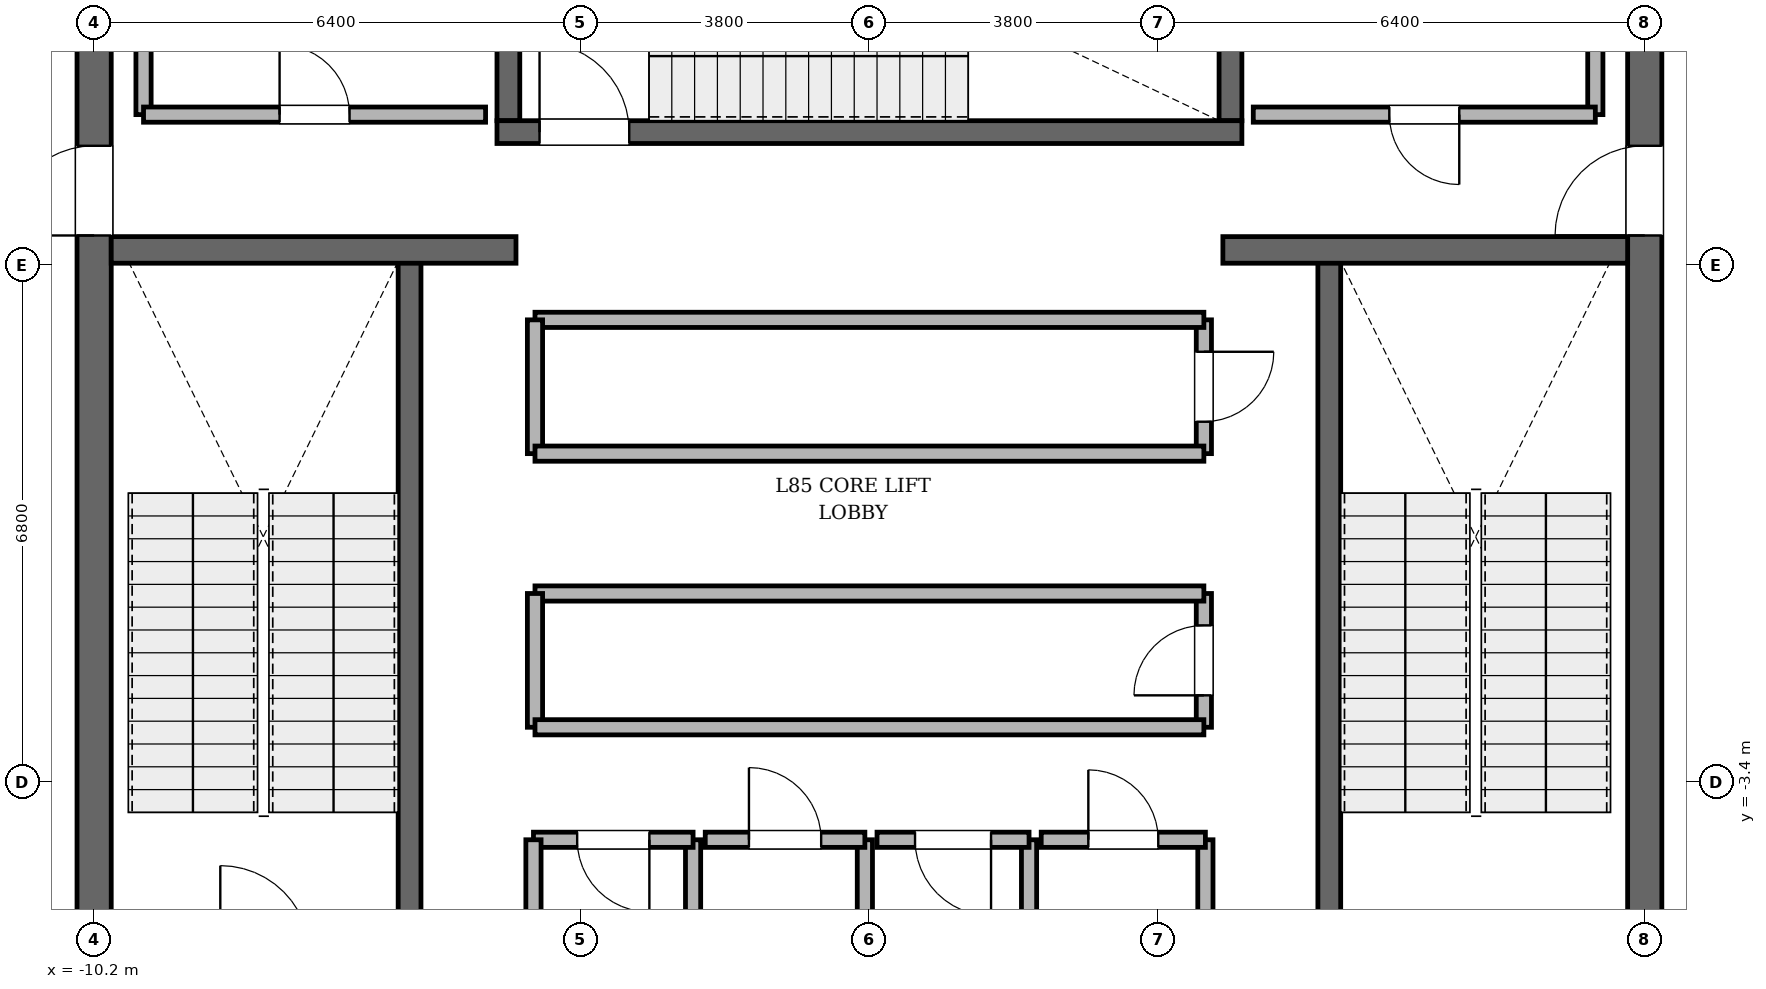
"""IFC4 building model, lengths in metres.
Left out: names, types, materials, properties, quantities, classifications, styles, units other than length and angle.
Written with IfcOpenShell. Run it as: python <this file> out.ifc"""

import sys

from ifc_helpers import new_model, si_unit, direction, frame, frame_2d, origin, place, context, subcontext, project, spatial, rectangle, extrude, element, fill, save


model = new_model("IFC4")
c1 = context("Model", 3, precision=1e-05, world=origin(), true_north=direction((0.0, 1.0)))
c2 = subcontext(c1, "Body", "Model", "MODEL_VIEW")
j1 = project(units=[si_unit("LENGTHUNIT", "METRE"), si_unit("PLANEANGLEUNIT", "RADIAN")], contexts=[c1])
p1 = place(None, origin())
s1 = spatial("IfcSite", under=j1, at=p1, CompositionType="ELEMENT")
p2 = place(p1, origin())
s2 = spatial("IfcBuilding", under=s1, at=p2, CompositionType="ELEMENT")
p3 = place(p2, frame((0.0, 0.0, 361.8)))
s3 = spatial("IfcBuildingStorey", under=s2, at=p3, CompositionType="ELEMENT", Elevation=361.8)
p4 = place(p3, frame((-10.2, -8.975, 0.0), z_axis=(0.0, 0.0, 1.0), x_axis=(0.0, 1.0, 0.0)))
e1 = element("IfcWall", 1, at=p4, inside=s3, PredefinedType="SHEAR", context=c2, shape_type="SweptSolid", body=[
    extrude(rectangle(XDim=17.95, YDim=0.45, at=frame_2d((8.975, 0.0))), origin(), (0.0, 0.0, 1.0), 4.5),
])
p5 = place(p4, frame((12.765, 0.0, 0.0)))
e2 = element("IfcOpeningElement", 2, at=p5, cuts=e1, PredefinedType="OPENING", context=c2, shape_type="SweptSolid", body=[
    extrude(rectangle(XDim=1.18, YDim=2.2, at=frame_2d((0.59, 1.1))), frame((0.0, 0.235, 0.0), z_axis=(0.0, -1.0, 0.0), x_axis=(1.0, 0.0, 0.0)), (0.0, 0.0, 1.0), 0.47),
])
p6 = place(p3, frame((10.2, 8.975, 0.0), z_axis=(0.0, 0.0, 1.0), x_axis=(0.0, -1.0, 0.0)))
e3 = element("IfcWall", 3, at=p6, inside=s3, PredefinedType="SHEAR", context=c2, shape_type="SweptSolid", body=[
    extrude(rectangle(XDim=17.95, YDim=0.45, at=frame_2d((8.975, 0.0))), origin(), (0.0, 0.0, 1.0), 4.5),
])
p7 = place(p6, frame((4.005, 0.0, 0.0)))
e4 = element("IfcOpeningElement", 4, at=p7, cuts=e3, PredefinedType="OPENING", context=c2, shape_type="SweptSolid", body=[
    extrude(rectangle(XDim=1.18, YDim=2.2, at=frame_2d((0.59, 1.1))), frame((0.0, 0.235, 0.0), z_axis=(0.0, -1.0, 0.0), x_axis=(1.0, 0.0, 0.0)), (0.0, 0.0, 1.0), 0.47),
])
for number, where, z_axis, x_axis in (
    (5, (-6.05, -5.5, 0.0), (0.0, 0.0, 1.0), (0.0, 1.0, 0.0)),
    (6, (6.05, 3.45, 0.0), (0.0, 0.0, 1.0), (0.0, -1.0, 0.0)),
):
    element("IfcWall", number, at=place(p3, frame(where, z_axis=z_axis, x_axis=x_axis)), inside=s3, PredefinedType="SOLIDWALL", context=c2, shape_type="SweptSolid", body=[
        extrude(rectangle(XDim=8.95, YDim=0.3, at=frame_2d((4.475, 0.0))), origin(), (0.0, 0.0, 1.0), 4.5),
    ])
for number, where, z_axis, x_axis in (
    (7, (-4.75, 5.3, 0.0), (0.0, 0.0, 1.0), (0.0, 1.0, 0.0)),
    (8, (4.75, 8.975, 0.0), (0.0, 0.0, 1.0), (0.0, -1.0, 0.0)),
):
    element("IfcWall", number, at=place(p3, frame(where, z_axis=z_axis, x_axis=x_axis)), inside=s3, PredefinedType="SOLIDWALL", context=c2, shape_type="SweptSolid", body=[
        extrude(rectangle(XDim=3.675, YDim=0.3, at=frame_2d((1.837, 0.0))), origin(), (0.0, 0.0, 1.0), 4.5),
    ])
p8 = place(p3, frame((-4.9, 5.15, 0.0), z_axis=(0.0, 0.0, 1.0), x_axis=(1.0, 0.0, 0.0)))
e9 = element("IfcWall", 9, at=p8, inside=s3, PredefinedType="SOLIDWALL", context=c2, shape_type="SweptSolid", body=[
    extrude(rectangle(XDim=9.8, YDim=0.3, at=frame_2d((4.9, 0.0))), origin(), (0.0, 0.0, 1.0), 4.5),
])
p9 = place(p8, frame((0.56, 0.0, 0.0)))
e10 = element("IfcOpeningElement", 10, at=p9, cuts=e9, PredefinedType="OPENING", context=c2, shape_type="SweptSolid", body=[
    extrude(rectangle(XDim=1.18, YDim=2.2, at=frame_2d((0.59, 1.1))), frame((0.0, 0.16, 0.0), z_axis=(0.0, -1.0, 0.0), x_axis=(1.0, 0.0, 0.0)), (0.0, 0.0, 1.0), 0.32),
])
for number, where, z_axis, x_axis in (
    (11, (-9.975, 3.6, 0.0), (0.0, 0.0, 1.0), (1.0, 0.0, 0.0)),
    (12, (4.65, 3.6, 0.0), (0.0, 0.0, 1.0), (1.0, 0.0, 0.0)),
):
    element("IfcWall", number, at=place(p3, frame(where, z_axis=z_axis, x_axis=x_axis)), inside=s3, PredefinedType="SOLIDWALL", context=c2, shape_type="SweptSolid", body=[
        extrude(rectangle(XDim=5.325, YDim=0.35, at=frame_2d((2.663, 0.0))), origin(), (0.0, 0.0, 1.0), 4.5),
    ])
p10 = place(p3, frame((-2.32, -5.9, 0.0), z_axis=(0.0, 0.0, 1.0), x_axis=(0.0, 1.0, 0.0)))
e13 = element("IfcWall", 13, at=p10, inside=s3, PredefinedType="SOLIDWALL", context=c2, shape_type="SweptSolid", body=[
    extrude(rectangle(XDim=1.74, YDim=0.2, at=frame_2d((0.87, 0.0))), origin(), (0.0, 0.0, 1.0), 4.28),
])
p11 = place(p3, frame((-2.32, -4.16, 0.0), z_axis=(0.0, 0.0, 1.0), x_axis=(-1.0, 0.0, 0.0)))
e14 = element("IfcWall", 14, at=p11, inside=s3, PredefinedType="SOLIDWALL", context=c2, shape_type="SweptSolid", body=[
    extrude(rectangle(XDim=2.1, YDim=0.2, at=frame_2d((1.05, 0.0))), origin(), (0.0, 0.0, 1.0), 4.28),
])
p12 = place(p11, frame((0.575, 0.0, 0.0)))
e15 = element("IfcOpeningElement", 15, at=p12, cuts=e14, PredefinedType="OPENING", context=c2, shape_type="SweptSolid", body=[
    extrude(rectangle(XDim=0.95, YDim=2.15, at=frame_2d((0.475, 1.075))), frame((0.0, 0.11, 0.0), z_axis=(0.0, -1.0, 0.0), x_axis=(1.0, 0.0, 0.0)), (0.0, 0.0, 1.0), 0.22),
])
for number, where, z_axis, x_axis in (
    (16, (-4.42, -4.16, 0.0), (0.0, 0.0, 1.0), (0.0, -1.0, 0.0)),
    (17, (-0.06, -5.9, 0.0), (0.0, 0.0, 1.0), (0.0, 1.0, 0.0)),
):
    element("IfcWall", number, at=place(p3, frame(where, z_axis=z_axis, x_axis=x_axis)), inside=s3, PredefinedType="SOLIDWALL", context=c2, shape_type="SweptSolid", body=[
        extrude(rectangle(XDim=1.74, YDim=0.2, at=frame_2d((0.87, 0.0))), origin(), (0.0, 0.0, 1.0), 4.28),
    ])
p13 = place(p3, frame((-0.06, -4.16, 0.0), z_axis=(0.0, 0.0, 1.0), x_axis=(-1.0, 0.0, 0.0)))
e18 = element("IfcWall", 18, at=p13, inside=s3, PredefinedType="SOLIDWALL", context=c2, shape_type="SweptSolid", body=[
    extrude(rectangle(XDim=2.1, YDim=0.2, at=frame_2d((1.05, 0.0))), origin(), (0.0, 0.0, 1.0), 4.28),
])
p14 = place(p13, frame((0.575, 0.0, 0.0)))
e19 = element("IfcOpeningElement", 19, at=p14, cuts=e18, PredefinedType="OPENING", context=c2, shape_type="SweptSolid", body=[
    extrude(rectangle(XDim=0.95, YDim=2.15, at=frame_2d((0.475, 1.075))), frame((0.0, 0.11, 0.0), z_axis=(0.0, -1.0, 0.0), x_axis=(1.0, 0.0, 0.0)), (0.0, 0.0, 1.0), 0.22),
])
p15 = place(p3, frame((2.1, -5.9, 0.0), z_axis=(0.0, 0.0, 1.0), x_axis=(0.0, 1.0, 0.0)))
e20 = element("IfcWall", 20, at=p15, inside=s3, PredefinedType="SOLIDWALL", context=c2, shape_type="SweptSolid", body=[
    extrude(rectangle(XDim=1.74, YDim=0.2, at=frame_2d((0.87, 0.0))), origin(), (0.0, 0.0, 1.0), 4.28),
])
p16 = place(p3, frame((2.1, -4.16, 0.0), z_axis=(0.0, 0.0, 1.0), x_axis=(-1.0, 0.0, 0.0)))
e21 = element("IfcWall", 21, at=p16, inside=s3, PredefinedType="SOLIDWALL", context=c2, shape_type="SweptSolid", body=[
    extrude(rectangle(XDim=2.0, YDim=0.2, at=frame_2d((1.0, 0.0))), origin(), (0.0, 0.0, 1.0), 4.28),
])
p17 = place(p16, frame((0.5, 0.0, 0.0)))
e22 = element("IfcOpeningElement", 22, at=p17, cuts=e21, PredefinedType="OPENING", context=c2, shape_type="SweptSolid", body=[
    extrude(rectangle(XDim=1.0, YDim=2.15, at=frame_2d((0.5, 1.075))), frame((0.0, 0.11, 0.0), z_axis=(0.0, -1.0, 0.0), x_axis=(1.0, 0.0, 0.0)), (0.0, 0.0, 1.0), 0.22),
])
p18 = place(p3, frame((4.42, -5.9, 0.0), z_axis=(0.0, 0.0, 1.0), x_axis=(0.0, 1.0, 0.0)))
e23 = element("IfcWall", 23, at=p18, inside=s3, PredefinedType="SOLIDWALL", context=c2, shape_type="SweptSolid", body=[
    extrude(rectangle(XDim=1.74, YDim=0.2, at=frame_2d((0.87, 0.0))), origin(), (0.0, 0.0, 1.0), 4.28),
])
p19 = place(p3, frame((4.42, -4.16, 0.0), z_axis=(0.0, 0.0, 1.0), x_axis=(-1.0, 0.0, 0.0)))
e24 = element("IfcWall", 24, at=p19, inside=s3, PredefinedType="SOLIDWALL", context=c2, shape_type="SweptSolid", body=[
    extrude(rectangle(XDim=2.16, YDim=0.2, at=frame_2d((1.08, 0.0))), origin(), (0.0, 0.0, 1.0), 4.28),
])
p20 = place(p19, frame((0.62, 0.0, 0.0)))
e25 = element("IfcOpeningElement", 25, at=p20, cuts=e24, PredefinedType="OPENING", context=c2, shape_type="SweptSolid", body=[
    extrude(rectangle(XDim=0.92, YDim=2.1, at=frame_2d((0.46, 1.05))), frame((0.0, 0.11, 0.0), z_axis=(0.0, -1.0, 0.0), x_axis=(1.0, 0.0, 0.0)), (0.0, 0.0, 1.0), 0.22),
])
p21 = place(p3, frame((4.4, -2.68, 0.0), z_axis=(0.0, 0.0, 1.0), x_axis=(0.0, 1.0, 0.0)))
e26 = element("IfcWall", 26, at=p21, inside=s3, PredefinedType="SOLIDWALL", context=c2, shape_type="SweptSolid", body=[
    extrude(rectangle(XDim=1.76, YDim=0.2, at=frame_2d((0.88, 0.0))), origin(), (0.0, 0.0, 1.0), 4.28),
])
p22 = place(p21, frame((0.42, 0.0, 0.0)))
e27 = element("IfcOpeningElement", 27, at=p22, cuts=e26, PredefinedType="OPENING", context=c2, shape_type="SweptSolid", body=[
    extrude(rectangle(XDim=0.92, YDim=2.1, at=frame_2d((0.46, 1.05))), frame((0.0, 0.11, 0.0), z_axis=(0.0, -1.0, 0.0), x_axis=(1.0, 0.0, 0.0)), (0.0, 0.0, 1.0), 0.22),
])
p23 = place(p3, frame((4.4, -0.92, 0.0), z_axis=(0.0, 0.0, 1.0), x_axis=(-1.0, 0.0, 0.0)))
e28 = element("IfcWall", 28, at=p23, inside=s3, PredefinedType="SOLIDWALL", context=c2, shape_type="SweptSolid", body=[
    extrude(rectangle(XDim=8.8, YDim=0.2, at=frame_2d((4.4, 0.0))), origin(), (0.0, 0.0, 1.0), 4.28),
])
p24 = place(p3, frame((-4.4, -0.92, 0.0), z_axis=(0.0, 0.0, 1.0), x_axis=(0.0, -1.0, 0.0)))
e29 = element("IfcWall", 29, at=p24, inside=s3, PredefinedType="SOLIDWALL", context=c2, shape_type="SweptSolid", body=[
    extrude(rectangle(XDim=1.76, YDim=0.2, at=frame_2d((0.88, 0.0))), origin(), (0.0, 0.0, 1.0), 4.28),
])
p25 = place(p3, frame((-4.4, -2.68, 0.0), z_axis=(0.0, 0.0, 1.0), x_axis=(1.0, 0.0, 0.0)))
e30 = element("IfcWall", 30, at=p25, inside=s3, PredefinedType="SOLIDWALL", context=c2, shape_type="SweptSolid", body=[
    extrude(rectangle(XDim=8.8, YDim=0.2, at=frame_2d((4.4, 0.0))), origin(), (0.0, 0.0, 1.0), 4.28),
])
p26 = place(p3, frame((4.4, 0.92, 0.0), z_axis=(0.0, 0.0, 1.0), x_axis=(0.0, 1.0, 0.0)))
e31 = element("IfcWall", 31, at=p26, inside=s3, PredefinedType="SOLIDWALL", context=c2, shape_type="SweptSolid", body=[
    extrude(rectangle(XDim=1.76, YDim=0.2, at=frame_2d((0.88, 0.0))), origin(), (0.0, 0.0, 1.0), 4.28),
])
p27 = place(p26, frame((0.42, 0.0, 0.0)))
e32 = element("IfcOpeningElement", 32, at=p27, cuts=e31, PredefinedType="OPENING", context=c2, shape_type="SweptSolid", body=[
    extrude(rectangle(XDim=0.92, YDim=2.1, at=frame_2d((0.46, 1.05))), frame((0.0, 0.11, 0.0), z_axis=(0.0, -1.0, 0.0), x_axis=(1.0, 0.0, 0.0)), (0.0, 0.0, 1.0), 0.22),
])
p28 = place(p3, frame((4.4, 2.68, 0.0), z_axis=(0.0, 0.0, 1.0), x_axis=(-1.0, 0.0, 0.0)))
e33 = element("IfcWall", 33, at=p28, inside=s3, PredefinedType="SOLIDWALL", context=c2, shape_type="SweptSolid", body=[
    extrude(rectangle(XDim=8.8, YDim=0.2, at=frame_2d((4.4, 0.0))), origin(), (0.0, 0.0, 1.0), 4.28),
])
p29 = place(p3, frame((-4.4, 2.68, 0.0), z_axis=(0.0, 0.0, 1.0), x_axis=(0.0, -1.0, 0.0)))
e34 = element("IfcWall", 34, at=p29, inside=s3, PredefinedType="SOLIDWALL", context=c2, shape_type="SweptSolid", body=[
    extrude(rectangle(XDim=1.76, YDim=0.2, at=frame_2d((0.88, 0.0))), origin(), (0.0, 0.0, 1.0), 4.28),
])
p30 = place(p3, frame((-4.4, 0.92, 0.0), z_axis=(0.0, 0.0, 1.0), x_axis=(1.0, 0.0, 0.0)))
e35 = element("IfcWall", 35, at=p30, inside=s3, PredefinedType="SOLIDWALL", context=c2, shape_type="SweptSolid", body=[
    extrude(rectangle(XDim=8.8, YDim=0.2, at=frame_2d((4.4, 0.0))), origin(), (0.0, 0.0, 1.0), 4.28),
])
p31 = place(p3, frame((-9.55, 8.65, 0.0), z_axis=(0.0, 0.0, 1.0), x_axis=(0.0, -1.0, 0.0)))
e36 = element("IfcWall", 36, at=p31, inside=s3, PredefinedType="SOLIDWALL", context=c2, shape_type="SweptSolid", body=[
    extrude(rectangle(XDim=3.27, YDim=0.2, at=frame_2d((1.635, 0.0))), origin(), (0.0, 0.0, 1.0), 4.28),
])
p32 = place(p3, frame((-9.55, 5.38, 0.0), z_axis=(0.0, 0.0, 1.0), x_axis=(1.0, 0.0, 0.0)))
e37 = element("IfcWall", 37, at=p32, inside=s3, PredefinedType="SOLIDWALL", context=c2, shape_type="SweptSolid", body=[
    extrude(rectangle(XDim=4.5, YDim=0.2, at=frame_2d((2.25, 0.0))), origin(), (0.0, 0.0, 1.0), 4.28),
])
p33 = place(p32, frame((1.79, 0.0, 0.0)))
e38 = element("IfcOpeningElement", 38, at=p33, cuts=e37, PredefinedType="OPENING", context=c2, shape_type="SweptSolid", body=[
    extrude(rectangle(XDim=0.92, YDim=2.1, at=frame_2d((0.46, 1.05))), frame((0.0, 0.11, 0.0), z_axis=(0.0, -1.0, 0.0), x_axis=(1.0, 0.0, 0.0)), (0.0, 0.0, 1.0), 0.22),
])
p34 = place(p3, frame((9.55, 5.38, 0.0), z_axis=(0.0, 0.0, 1.0), x_axis=(0.0, 1.0, 0.0)))
e39 = element("IfcWall", 39, at=p34, inside=s3, PredefinedType="SOLIDWALL", context=c2, shape_type="SweptSolid", body=[
    extrude(rectangle(XDim=3.27, YDim=0.2, at=frame_2d((1.635, 0.0))), origin(), (0.0, 0.0, 1.0), 4.28),
])
p35 = place(p3, frame((5.05, 5.38, 0.0), z_axis=(0.0, 0.0, 1.0), x_axis=(1.0, 0.0, 0.0)))
e40 = element("IfcWall", 40, at=p35, inside=s3, PredefinedType="SOLIDWALL", context=c2, shape_type="SweptSolid", body=[
    extrude(rectangle(XDim=4.5, YDim=0.2, at=frame_2d((2.25, 0.0))), origin(), (0.0, 0.0, 1.0), 4.28),
])
p36 = place(p35, frame((1.79, 0.0, 0.0)))
e41 = element("IfcOpeningElement", 41, at=p36, cuts=e40, PredefinedType="OPENING", context=c2, shape_type="SweptSolid", body=[
    extrude(rectangle(XDim=0.92, YDim=2.1, at=frame_2d((0.46, 1.05))), frame((0.0, 0.11, 0.0), z_axis=(0.0, -1.0, 0.0), x_axis=(1.0, 0.0, 0.0)), (0.0, 0.0, 1.0), 0.22),
])
p37 = place(p9, origin())
e42 = element("IfcDoor", 42, at=p37, inside=s3, OperationType="SINGLE_SWING_LEFT", PredefinedType="DOOR", context=c2, shape_type="SweptSolid", body=[
    extrude(rectangle(XDim=1.18, YDim=2.2, at=frame_2d((0.59, 1.1))), frame((0.0, 0.025, 0.0), z_axis=(0.0, -1.0, 0.0), x_axis=(1.0, 0.0, 0.0)), (0.0, 0.0, 1.0), 0.05),
])
fill(e10, e42)
p38 = place(p5, origin())
e43 = element("IfcDoor", 43, at=p38, inside=s3, OperationType="SINGLE_SWING_LEFT", PredefinedType="DOOR", context=c2, shape_type="SweptSolid", body=[
    extrude(rectangle(XDim=1.18, YDim=2.2, at=frame_2d((0.59, 1.1))), frame((0.0, 0.025, 0.0), z_axis=(0.0, -1.0, 0.0), x_axis=(1.0, 0.0, 0.0)), (0.0, 0.0, 1.0), 0.05),
])
fill(e2, e43)
p39 = place(p7, origin())
e44 = element("IfcDoor", 44, at=p39, inside=s3, OperationType="SINGLE_SWING_RIGHT", PredefinedType="DOOR", context=c2, shape_type="SweptSolid", body=[
    extrude(rectangle(XDim=1.18, YDim=2.2, at=frame_2d((0.59, 1.1))), frame((0.0, 0.025, 0.0), z_axis=(0.0, -1.0, 0.0), x_axis=(1.0, 0.0, 0.0)), (0.0, 0.0, 1.0), 0.05),
])
fill(e4, e44)
p40 = place(p12, origin())
e45 = element("IfcDoor", 45, at=p40, inside=s3, OperationType="SINGLE_SWING_LEFT", PredefinedType="DOOR", context=c2, shape_type="SweptSolid", body=[
    extrude(rectangle(XDim=0.95, YDim=2.15, at=frame_2d((0.475, 1.075))), frame((0.0, 0.025, 0.0), z_axis=(0.0, -1.0, 0.0), x_axis=(1.0, 0.0, 0.0)), (0.0, 0.0, 1.0), 0.05),
])
fill(e15, e45)
p41 = place(p14, origin())
e46 = element("IfcDoor", 46, at=p41, inside=s3, OperationType="SINGLE_SWING_RIGHT", PredefinedType="DOOR", context=c2, shape_type="SweptSolid", body=[
    extrude(rectangle(XDim=0.95, YDim=2.15, at=frame_2d((0.475, 1.075))), frame((0.0, 0.025, 0.0), z_axis=(0.0, -1.0, 0.0), x_axis=(1.0, 0.0, 0.0)), (0.0, 0.0, 1.0), 0.05),
])
fill(e19, e46)
p42 = place(p17, origin())
e47 = element("IfcDoor", 47, at=p42, inside=s3, OperationType="SINGLE_SWING_LEFT", PredefinedType="DOOR", context=c2, shape_type="SweptSolid", body=[
    extrude(rectangle(XDim=1.0, YDim=2.15, at=frame_2d((0.5, 1.075))), frame((0.0, 0.025, 0.0), z_axis=(0.0, -1.0, 0.0), x_axis=(1.0, 0.0, 0.0)), (0.0, 0.0, 1.0), 0.05),
])
fill(e22, e47)
p43 = place(p20, origin())
e48 = element("IfcDoor", 48, at=p43, inside=s3, OperationType="SINGLE_SWING_RIGHT", PredefinedType="DOOR", context=c2, shape_type="SweptSolid", body=[
    extrude(rectangle(XDim=0.92, YDim=2.1, at=frame_2d((0.46, 1.05))), frame((0.0, 0.025, 0.0), z_axis=(0.0, -1.0, 0.0), x_axis=(1.0, 0.0, 0.0)), (0.0, 0.0, 1.0), 0.05),
])
fill(e25, e48)
p44 = place(p22, origin())
e49 = element("IfcDoor", 49, at=p44, inside=s3, OperationType="SINGLE_SWING_LEFT", PredefinedType="DOOR", context=c2, shape_type="SweptSolid", body=[
    extrude(rectangle(XDim=0.92, YDim=2.1, at=frame_2d((0.46, 1.05))), frame((0.0, 0.025, 0.0), z_axis=(0.0, -1.0, 0.0), x_axis=(1.0, 0.0, 0.0)), (0.0, 0.0, 1.0), 0.05),
])
fill(e27, e49)
p45 = place(p27, origin())
e50 = element("IfcDoor", 50, at=p45, inside=s3, OperationType="SINGLE_SWING_RIGHT", PredefinedType="DOOR", context=c2, shape_type="SweptSolid", body=[
    extrude(rectangle(XDim=0.92, YDim=2.1, at=frame_2d((0.46, 1.05))), frame((0.0, 0.025, 0.0), z_axis=(0.0, -1.0, 0.0), x_axis=(1.0, 0.0, 0.0)), (0.0, 0.0, 1.0), 0.05),
])
fill(e32, e50)
p46 = place(p33, origin())
e51 = element("IfcDoor", 51, at=p46, inside=s3, OperationType="SINGLE_SWING_LEFT", PredefinedType="DOOR", context=c2, shape_type="SweptSolid", body=[
    extrude(rectangle(XDim=0.92, YDim=2.1, at=frame_2d((0.46, 1.05))), frame((0.0, 0.025, 0.0), z_axis=(0.0, -1.0, 0.0), x_axis=(1.0, 0.0, 0.0)), (0.0, 0.0, 1.0), 0.05),
])
fill(e38, e51)
p47 = place(p36, origin())
e52 = element("IfcDoor", 52, at=p47, inside=s3, OperationType="SINGLE_SWING_RIGHT", PredefinedType="DOOR", context=c2, shape_type="SweptSolid", body=[
    extrude(rectangle(XDim=0.92, YDim=2.1, at=frame_2d((0.46, 1.05))), frame((0.0, 0.025, 0.0), z_axis=(0.0, -1.0, 0.0), x_axis=(1.0, 0.0, 0.0)), (0.0, 0.0, 1.0), 0.05),
])
fill(e41, e52)
save(model, sys.argv[1])
